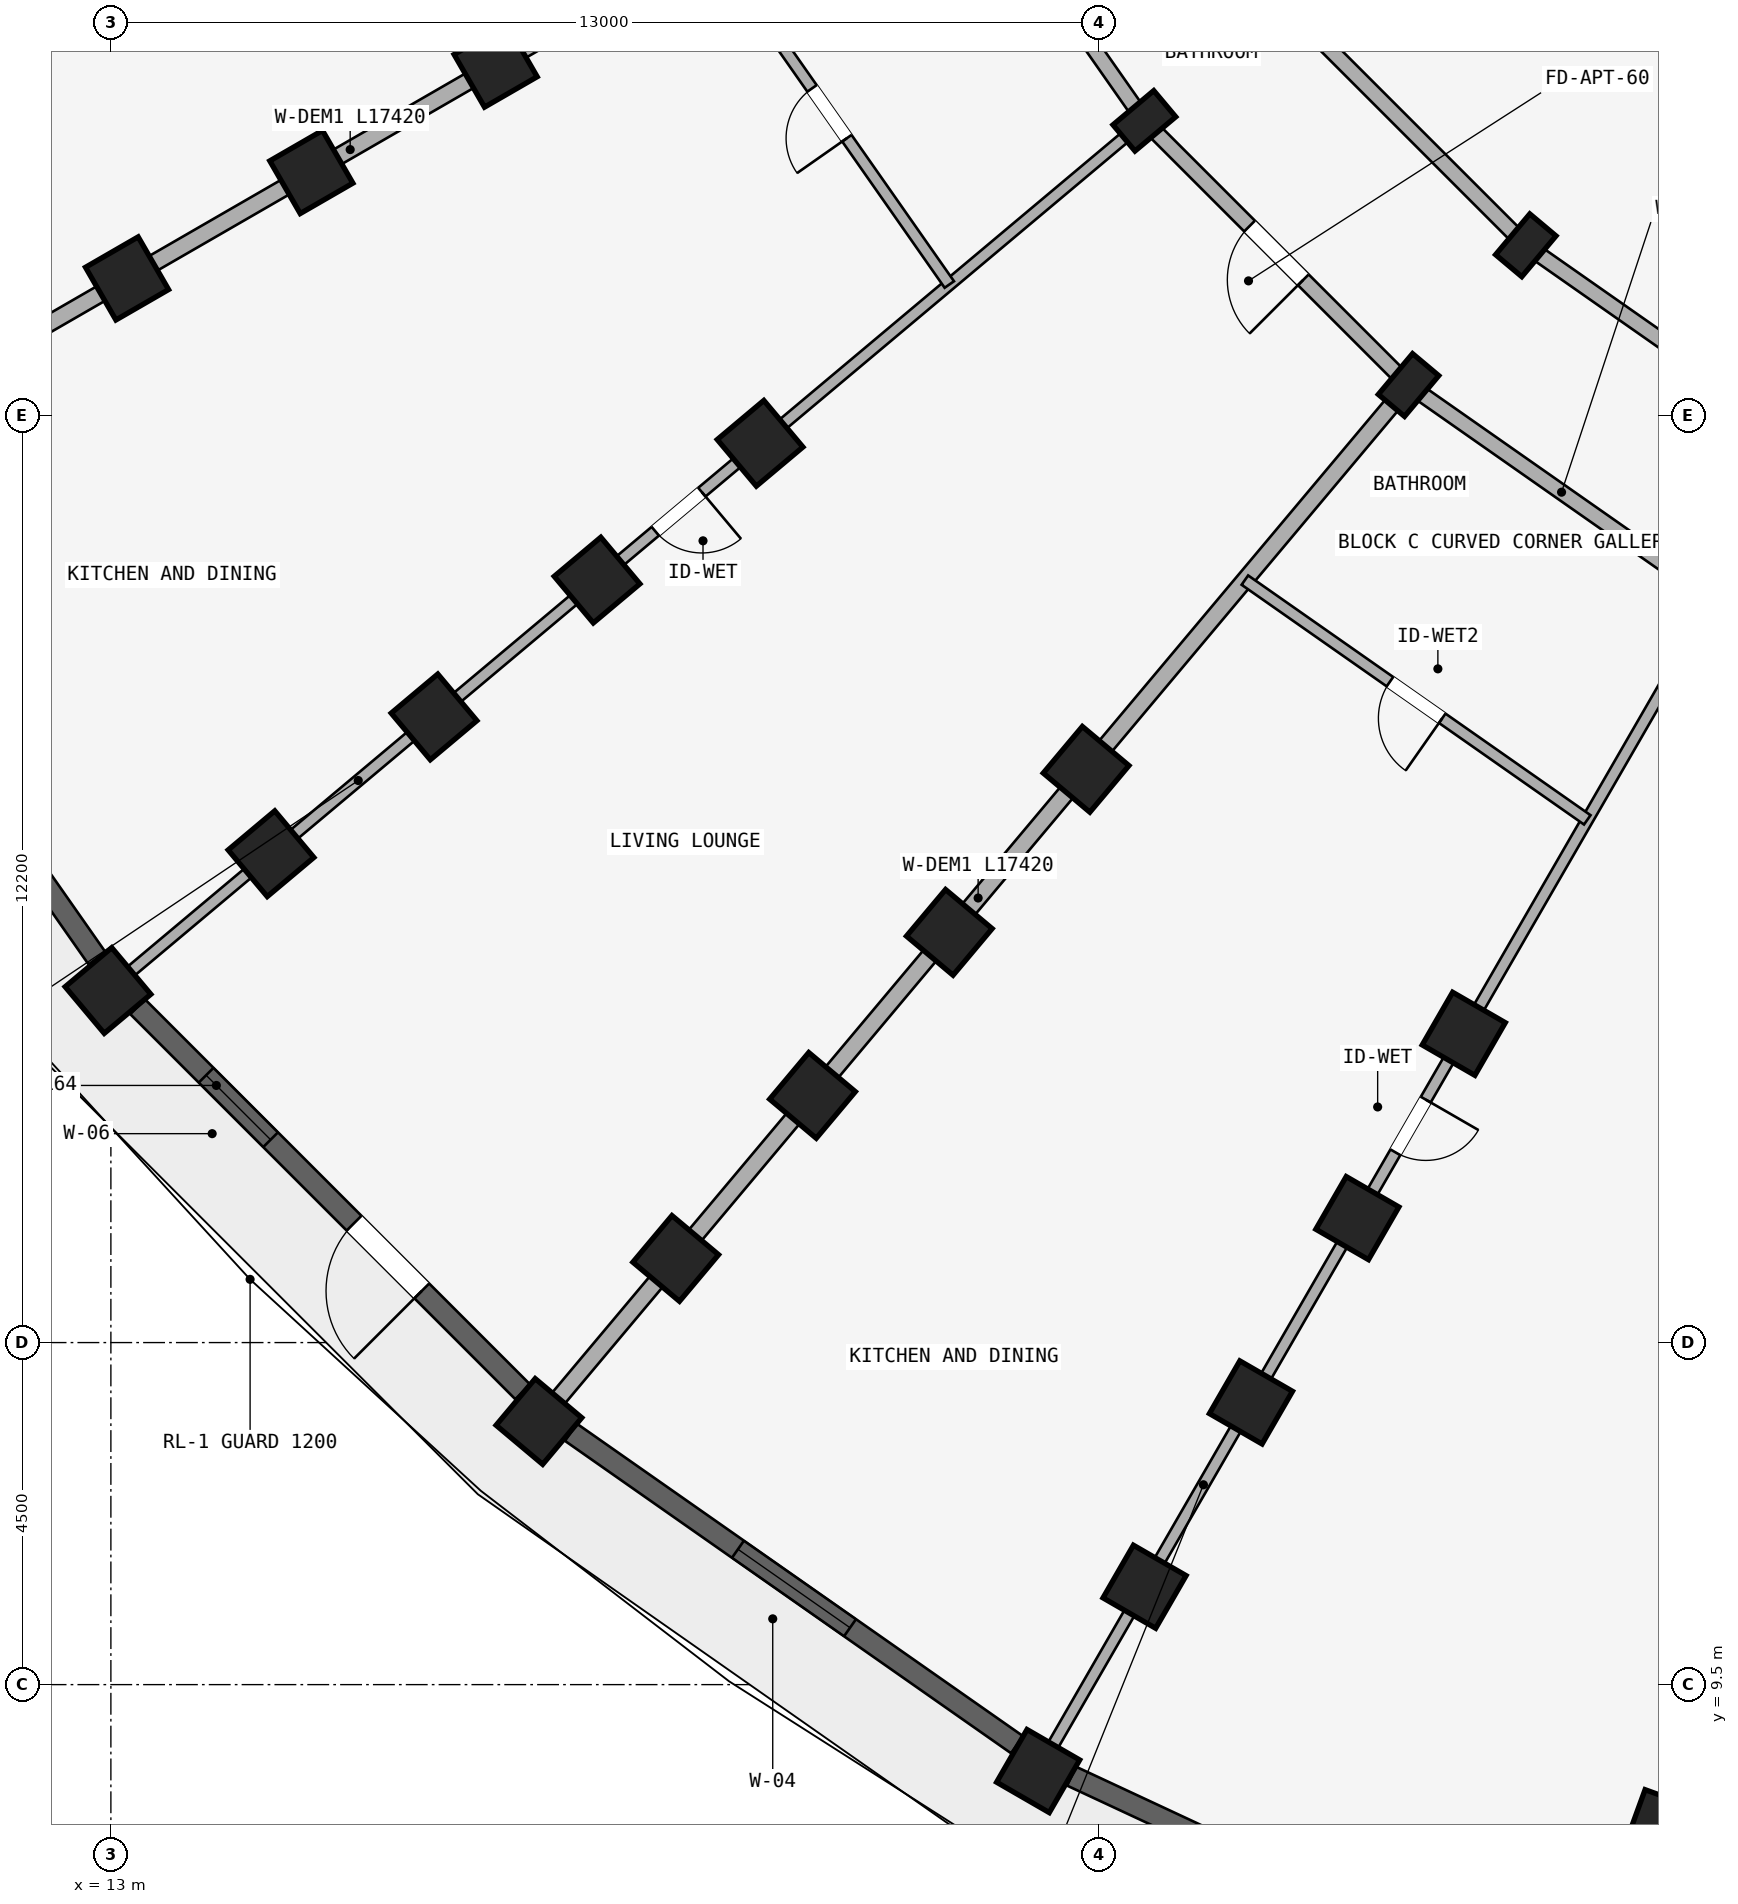
"""IFC4 building model, lengths in metres.
Left out: names, types, materials, properties, quantities, classifications, styles, units other than length and angle.
Written with IfcOpenShell. Run it as: python <this file> out.ifc"""

import sys

from ifc_helpers import new_model, si_unit, direction, frame, frame_2d, origin, origin_2d, place, context, subcontext, project, spatial, rectangle, extrude, element, fill, save


model = new_model("IFC4")
c1 = context("Model", 3, precision=1e-05, world=origin(), true_north=direction((0.0, 1.0)))
c2 = subcontext(c1, "Body", "Model", "MODEL_VIEW")
j1 = project(units=[si_unit("LENGTHUNIT", "METRE"), si_unit("PLANEANGLEUNIT", "RADIAN")], contexts=[c1])
p1 = place(None, origin())
s1 = spatial("IfcSite", under=j1, at=p1, CompositionType="ELEMENT")
p2 = place(p1, origin())
s2 = spatial("IfcBuilding", under=s1, at=p2, CompositionType="ELEMENT")
p3 = place(p2, frame((0.0, 0.0, 15.0)))
s3 = spatial("IfcBuildingStorey", under=s2, at=p3, CompositionType="ELEMENT", Elevation=15.0)
for number, where, z_axis, x_axis in (
    (1, (33.425, 7.605, 0.0), (0.0, 0.0, 1.0), (-0.94, 0.342, 0.0)),
    (2, (30.8, 18.062, 0.0), (0.0, 0.0, 1.0), (-0.866, 0.5, 0.0)),
    (3, (29.4, 15.637, 0.0), (0.0, 0.0, 1.0), (-0.866, 0.5, 0.0)),
    (4, (28.0, 13.213, 0.0), (0.0, 0.0, 1.0), (-0.866, 0.5, 0.0)),
    (5, (26.6, 10.788, 0.0), (0.0, 0.0, 1.0), (-0.866, 0.5, 0.0)),
    (6, (25.2, 8.363, 0.0), (0.0, 0.0, 1.0), (-0.866, 0.5, 0.0)),
):
    element("IfcColumn", number, at=place(p3, frame(where, z_axis=z_axis, x_axis=x_axis)), inside=s3, PredefinedType="COLUMN", context=c2, shape_type="SweptSolid", body=[
        extrude(rectangle(XDim=0.8, YDim=0.8, at=origin_2d()), origin(), (0.0, 0.0, 1.0), 2.93),
    ])
for number, where, z_axis, x_axis in (
    (7, (31.616, 28.436, 0.0), (0.0, 0.0, 1.0), (-0.766, 0.643, 0.0)),
    (8, (30.073, 26.598, 0.0), (0.0, 0.0, 1.0), (-0.766, 0.643, 0.0)),
):
    element("IfcColumn", number, at=place(p3, frame(where, z_axis=z_axis, x_axis=x_axis)), inside=s3, PredefinedType="COLUMN", context=c2, shape_type="SweptSolid", body=[
        extrude(rectangle(XDim=0.45, YDim=0.7, at=origin_2d()), origin(), (0.0, 0.0, 1.0), 2.93),
    ])
for number, where, z_axis, x_axis in (
    (9, (25.831, 21.542, 0.0), (0.0, 0.0, 1.0), (-0.766, 0.643, 0.0)),
    (10, (24.031, 19.397, 0.0), (0.0, 0.0, 1.0), (-0.766, 0.643, 0.0)),
    (11, (22.231, 17.252, 0.0), (0.0, 0.0, 1.0), (-0.766, 0.643, 0.0)),
    (12, (20.432, 15.107, 0.0), (0.0, 0.0, 1.0), (-0.766, 0.643, 0.0)),
    (13, (18.632, 12.962, 0.0), (0.0, 0.0, 1.0), (-0.766, 0.643, 0.0)),
):
    element("IfcColumn", number, at=place(p3, frame(where, z_axis=z_axis, x_axis=x_axis)), inside=s3, PredefinedType="COLUMN", context=c2, shape_type="SweptSolid", body=[
        extrude(rectangle(XDim=0.8, YDim=0.8, at=origin_2d()), origin(), (0.0, 0.0, 1.0), 2.93),
    ])
p4 = place(p3, frame((26.598, 30.073, 0.0), z_axis=(0.0, 0.0, 1.0), x_axis=(-0.642787609687, 0.766044443119, 0.0)))
e14 = element("IfcColumn", 14, at=p4, inside=s3, PredefinedType="COLUMN", context=c2, shape_type="SweptSolid", body=[
    extrude(rectangle(XDim=0.45, YDim=0.7, at=origin_2d()), origin(), (0.0, 0.0, 1.0), 2.93),
])
for number, where, z_axis, x_axis in (
    (15, (21.542, 25.831, 0.0), (0.0, 0.0, 1.0), (-0.643, 0.766, 0.0)),
    (16, (19.397, 24.031, 0.0), (0.0, 0.0, 1.0), (-0.643, 0.766, 0.0)),
    (17, (17.252, 22.231, 0.0), (0.0, 0.0, 1.0), (-0.643, 0.766, 0.0)),
    (18, (15.107, 20.432, 0.0), (0.0, 0.0, 1.0), (-0.643, 0.766, 0.0)),
    (19, (12.962, 18.632, 0.0), (0.0, 0.0, 1.0), (-0.643, 0.766, 0.0)),
    (20, (18.062, 30.8, 0.0), (0.0, 0.0, 1.0), (-0.5, 0.866, 0.0)),
    (21, (15.637, 29.4, 0.0), (0.0, 0.0, 1.0), (-0.5, 0.866, 0.0)),
    (22, (13.213, 28.0, 0.0), (0.0, 0.0, 1.0), (-0.5, 0.866, 0.0)),
):
    element("IfcColumn", number, at=place(p3, frame(where, z_axis=z_axis, x_axis=x_axis)), inside=s3, PredefinedType="COLUMN", context=c2, shape_type="SweptSolid", body=[
        extrude(rectangle(XDim=0.8, YDim=0.8, at=origin_2d()), origin(), (0.0, 0.0, 1.0), 2.93),
    ])
p5 = place(p3, frame((35.3, 25.856, 0.0), z_axis=(0.0, 0.0, 1.0), x_axis=(-0.819155404658, 0.573571637217, 0.0)))
e23 = element("IfcWall", 23, at=p5, inside=s3, PredefinedType="STANDARD", context=c2, shape_type="SweptSolid", body=[
    extrude(rectangle(XDim=4.497, YDim=0.2, at=frame_2d((2.249, 0.0))), origin(), (0.0, 0.0, 1.0), 2.372),
])
p6 = place(p3, frame((34.1, 23.778, 0.0), z_axis=(0.0, 0.0, 1.0), x_axis=(-0.819140911474, 0.573592335331, 0.0)))
e24 = element("IfcWall", 24, at=p6, inside=s3, PredefinedType="STANDARD", context=c2, shape_type="SweptSolid", body=[
    extrude(rectangle(XDim=4.916, YDim=0.2, at=frame_2d((2.458, 0.0))), origin(), (0.0, 0.0, 1.0), 2.372),
])
p7 = place(p3, frame((31.616, 28.436, 0.0), z_axis=(0.0, 0.0, 1.0), x_axis=(-0.707106781187, 0.707106781187, 0.0)))
e25 = element("IfcWall", 25, at=p7, inside=s3, PredefinedType="STANDARD", context=c2, shape_type="SweptSolid", body=[
    extrude(rectangle(XDim=4.497, YDim=0.2, at=frame_2d((2.249, 0.0))), origin(), (0.0, 0.0, 1.0), 2.372),
])
p8 = place(p3, frame((30.073, 26.598, 0.0), z_axis=(0.0, 0.0, 1.0), x_axis=(-0.707106781187, 0.707106781187, 0.0)))
e26 = element("IfcWall", 26, at=p8, inside=s3, PredefinedType="STANDARD", context=c2, shape_type="SweptSolid", body=[
    extrude(rectangle(XDim=4.916, YDim=0.2, at=frame_2d((2.458, 0.0))), origin(), (0.0, 0.0, 1.0), 2.372),
])
p9 = place(p8, frame((1.958, 0.0, 0.0)))
e27 = element("IfcOpeningElement", 27, at=p9, cuts=e26, PredefinedType="OPENING", context=c2, shape_type="SweptSolid", body=[
    extrude(rectangle(XDim=1.0, YDim=2.15, at=frame_2d((0.5, 1.075))), frame((0.0, 0.11, 0.0), z_axis=(0.0, -1.0, 0.0), x_axis=(1.0, 0.0, 0.0)), (0.0, 0.0, 1.0), 0.22),
])
p10 = place(p3, frame((26.598, 30.073, 0.0), z_axis=(0.0, 0.0, 1.0), x_axis=(-0.573592335331, 0.819140911474, 0.0)))
e28 = element("IfcWall", 28, at=p10, inside=s3, PredefinedType="STANDARD", context=c2, shape_type="SweptSolid", body=[
    extrude(rectangle(XDim=4.916, YDim=0.2, at=frame_2d((2.458, 0.0))), origin(), (0.0, 0.0, 1.0), 2.372),
])
p11 = place(p3, frame((38.521, 21.607, 0.0), z_axis=(0.0, 0.0, 1.0), x_axis=(-0.342022120477, -0.939691901159, 0.0)))
e29 = element("IfcWall", 29, at=p11, inside=s3, PredefinedType="PARTITIONING", context=c2, shape_type="SweptSolid", body=[
    extrude(rectangle(XDim=17.42, YDim=0.15, at=frame_2d((8.71, 0.0))), origin(), (0.0, 0.0, 1.0), 2.372),
])
p12 = place(p11, frame((7.5, 0.0, 0.0)))
e30 = element("IfcOpeningElement", 30, at=p12, cuts=e29, PredefinedType="OPENING", context=c2, shape_type="SweptSolid", body=[
    extrude(rectangle(XDim=0.8, YDim=2.1, at=frame_2d((0.4, 1.05))), frame((0.0, 0.085, 0.0), z_axis=(0.0, -1.0, 0.0), x_axis=(1.0, 0.0, 0.0)), (0.0, 0.0, 1.0), 0.17),
])
p13 = place(p3, frame((34.05, 23.691, 0.0), z_axis=(0.0, 0.0, 1.0), x_axis=(-0.499997843263, -0.866026648973, 0.0)))
e31 = element("IfcWall", 31, at=p13, inside=s3, PredefinedType="PARTITIONING", context=c2, shape_type="SweptSolid", body=[
    extrude(rectangle(XDim=17.42, YDim=0.15, at=frame_2d((8.71, 0.0))), origin(), (0.0, 0.0, 1.0), 2.372),
])
p14 = place(p13, frame((7.5, 0.0, 0.0)))
e32 = element("IfcOpeningElement", 32, at=p14, cuts=e31, PredefinedType="OPENING", context=c2, shape_type="SweptSolid", body=[
    extrude(rectangle(XDim=0.8, YDim=2.1, at=frame_2d((0.4, 1.05))), frame((0.0, 0.085, 0.0), z_axis=(0.0, -1.0, 0.0), x_axis=(1.0, 0.0, 0.0)), (0.0, 0.0, 1.0), 0.17),
])
p15 = place(p3, frame((30.009, 26.521, 0.0), z_axis=(0.0, 0.0, 1.0), x_axis=(-0.642784757967, -0.766046835987, 0.0)))
e33 = element("IfcWall", 33, at=p15, inside=s3, PredefinedType="STANDARD", context=c2, shape_type="SweptSolid", body=[
    extrude(rectangle(XDim=17.42, YDim=0.22, at=frame_2d((8.71, 0.0))), origin(), (0.0, 0.0, 1.0), 2.372),
])
p16 = place(p3, frame((26.521, 30.009, 0.0), z_axis=(0.0, 0.0, 1.0), x_axis=(-0.766046835987, -0.642784757967, 0.0)))
e34 = element("IfcWall", 34, at=p16, inside=s3, PredefinedType="PARTITIONING", context=c2, shape_type="SweptSolid", body=[
    extrude(rectangle(XDim=17.42, YDim=0.15, at=frame_2d((8.71, 0.0))), origin(), (0.0, 0.0, 1.0), 2.372),
])
p17 = place(p16, frame((7.5, 0.0, 0.0)))
e35 = element("IfcOpeningElement", 35, at=p17, cuts=e34, PredefinedType="OPENING", context=c2, shape_type="SweptSolid", body=[
    extrude(rectangle(XDim=0.8, YDim=2.1, at=frame_2d((0.4, 1.05))), frame((0.0, 0.085, 0.0), z_axis=(0.0, -1.0, 0.0), x_axis=(1.0, 0.0, 0.0)), (0.0, 0.0, 1.0), 0.17),
])
p18 = place(p3, frame((23.691, 34.05, 0.0), z_axis=(0.0, 0.0, 1.0), x_axis=(-0.866026648973, -0.499997843263, 0.0)))
e36 = element("IfcWall", 36, at=p18, inside=s3, PredefinedType="STANDARD", context=c2, shape_type="SweptSolid", body=[
    extrude(rectangle(XDim=17.42, YDim=0.22, at=frame_2d((8.71, 0.0))), origin(), (0.0, 0.0, 1.0), 2.372),
])
p19 = place(p3, frame((32.425, 20.877, 0.0), z_axis=(0.0, 0.0, 1.0), x_axis=(-0.819156831143, 0.573569599955, 0.0)))
e37 = element("IfcWall", 37, at=p19, inside=s3, PredefinedType="PLUMBINGWALL", context=c2, shape_type="SweptSolid", body=[
    extrude(rectangle(XDim=5.5, YDim=0.15, at=frame_2d((2.75, 0.0))), origin(), (0.0, 0.0, 1.0), 2.372),
])
p20 = place(p19, frame((2.33, 0.0, 0.0)))
e38 = element("IfcOpeningElement", 38, at=p20, cuts=e37, PredefinedType="OPENING", context=c2, shape_type="SweptSolid", body=[
    extrude(rectangle(XDim=0.84, YDim=2.1, at=frame_2d((0.42, 1.05))), frame((0.0, 0.085, 0.0), z_axis=(0.0, -1.0, 0.0), x_axis=(1.0, 0.0, 0.0)), (0.0, 0.0, 1.0), 0.17),
])
p21 = place(p3, frame((24.031, 27.92, 0.0), z_axis=(0.0, 0.0, 1.0), x_axis=(-0.573569599955, 0.819156831143, 0.0)))
e39 = element("IfcWall", 39, at=p21, inside=s3, PredefinedType="PLUMBINGWALL", context=c2, shape_type="SweptSolid", body=[
    extrude(rectangle(XDim=5.5, YDim=0.15, at=frame_2d((2.75, 0.0))), origin(), (0.0, 0.0, 1.0), 2.372),
])
p22 = place(p21, frame((2.35, 0.0, 0.0)))
e40 = element("IfcOpeningElement", 40, at=p22, cuts=e39, PredefinedType="OPENING", context=c2, shape_type="SweptSolid", body=[
    extrude(rectangle(XDim=0.8, YDim=2.1, at=frame_2d((0.4, 1.05))), frame((0.0, 0.085, 0.0), z_axis=(0.0, -1.0, 0.0), x_axis=(1.0, 0.0, 0.0)), (0.0, 0.0, 1.0), 0.17),
])
p23 = place(p3, frame((32.133, 5.268, 0.0), z_axis=(0.0, 0.0, 1.0), x_axis=(-0.906300636296, 0.422633596215, 0.0)))
e41 = element("IfcWall", 41, at=p23, inside=s3, PredefinedType="STANDARD", context=c2, shape_type="SweptSolid", body=[
    extrude(rectangle(XDim=7.164, YDim=0.275, at=frame_2d((3.582, 0.0))), origin(), (0.0, 0.0, 1.0), 2.472),
])
p24 = place(p23, frame((2.607, 0.0, 0.422)))
e42 = element("IfcOpeningElement", 42, at=p24, cuts=e41, PredefinedType="OPENING", context=c2, shape_type="SweptSolid", body=[
    extrude(rectangle(XDim=1.95, YDim=1.85, at=frame_2d((0.975, 0.925))), frame((0.0, 0.147, 0.0), z_axis=(0.0, -1.0, 0.0), x_axis=(1.0, 0.0, 0.0)), (0.0, 0.0, 1.0), 0.295),
])
p25 = place(p3, frame((24.922, 8.71, 0.0), z_axis=(0.0, 0.0, 1.0), x_axis=(-0.819161471697, 0.573562972382, 0.0)))
e43 = element("IfcWall", 43, at=p25, inside=s3, PredefinedType="STANDARD", context=c2, shape_type="SweptSolid", body=[
    extrude(rectangle(XDim=7.164, YDim=0.275, at=frame_2d((3.582, 0.0))), origin(), (0.0, 0.0, 1.0), 2.472),
])
p26 = place(p25, frame((2.682, 0.0, 0.622)))
e44 = element("IfcOpeningElement", 44, at=p26, cuts=e43, PredefinedType="OPENING", context=c2, shape_type="SweptSolid", body=[
    extrude(rectangle(XDim=1.8, YDim=1.65, at=frame_2d((0.9, 0.825))), frame((0.0, 0.147, 0.0), z_axis=(0.0, -1.0, 0.0), x_axis=(1.0, 0.0, 0.0)), (0.0, 0.0, 1.0), 0.295),
])
p27 = place(p3, frame((18.418, 13.352, 0.0), z_axis=(0.0, 0.0, 1.0), x_axis=(-0.707106781187, 0.707106781187, 0.0)))
e45 = element("IfcWall", 45, at=p27, inside=s3, PredefinedType="STANDARD", context=c2, shape_type="SweptSolid", body=[
    extrude(rectangle(XDim=7.164, YDim=0.275, at=frame_2d((3.582, 0.0))), origin(), (0.0, 0.0, 1.0), 2.472),
])
p28 = place(p27, frame((4.69, 0.0, 0.522)))
e46 = element("IfcOpeningElement", 46, at=p28, cuts=e45, PredefinedType="OPENING", context=c2, shape_type="SweptSolid", body=[
    extrude(rectangle(XDim=1.2, YDim=1.5, at=frame_2d((0.6, 0.75))), frame((0.0, 0.147, 0.0), z_axis=(0.0, -1.0, 0.0), x_axis=(1.0, 0.0, 0.0)), (0.0, 0.0, 1.0), 0.295),
])
p29 = place(p27, frame((1.877, 0.0, 0.0)))
e47 = element("IfcOpeningElement", 47, at=p29, cuts=e45, PredefinedType="OPENING", context=c2, shape_type="SweptSolid", body=[
    extrude(rectangle(XDim=1.26, YDim=2.15, at=frame_2d((0.63, 1.075))), frame((0.0, 0.147, 0.0), z_axis=(0.0, -1.0, 0.0), x_axis=(1.0, 0.0, 0.0)), (0.0, 0.0, 1.0), 0.295),
])
p30 = place(p3, frame((12.819, 19.053, 0.0), z_axis=(0.0, 0.0, 1.0), x_axis=(-0.573562972382, 0.819161471697, 0.0)))
e48 = element("IfcWall", 48, at=p30, inside=s3, PredefinedType="STANDARD", context=c2, shape_type="SweptSolid", body=[
    extrude(rectangle(XDim=7.164, YDim=0.275, at=frame_2d((3.582, 0.0))), origin(), (0.0, 0.0, 1.0), 2.472),
])
p31 = place(p30, frame((2.457, 0.0, 0.322)))
e49 = element("IfcOpeningElement", 49, at=p31, cuts=e48, PredefinedType="OPENING", context=c2, shape_type="SweptSolid", body=[
    extrude(rectangle(XDim=2.25, YDim=1.95, at=frame_2d((1.125, 0.975))), frame((0.0, 0.147, 0.0), z_axis=(0.0, -1.0, 0.0), x_axis=(1.0, 0.0, 0.0)), (0.0, 0.0, 1.0), 0.295),
])
p32 = place(p26, origin())
e50 = element("IfcWindow", 50, at=p32, inside=s3, PartitioningType="DOUBLE_PANEL_VERTICAL", PredefinedType="WINDOW", context=c2, shape_type="SweptSolid", body=[
    extrude(rectangle(XDim=1.8, YDim=1.65, at=frame_2d((0.9, 0.825))), frame((0.0, 0.03, 0.0), z_axis=(0.0, -1.0, 0.0), x_axis=(1.0, 0.0, 0.0)), (0.0, 0.0, 1.0), 0.06),
])
fill(e44, e50)
p33 = place(p28, origin())
e51 = element("IfcWindow", 51, at=p33, inside=s3, PartitioningType="SINGLE_PANEL", PredefinedType="WINDOW", context=c2, shape_type="SweptSolid", body=[
    extrude(rectangle(XDim=1.2, YDim=1.5, at=frame_2d((0.6, 0.75))), frame((0.0, 0.03, 0.0), z_axis=(0.0, -1.0, 0.0), x_axis=(1.0, 0.0, 0.0)), (0.0, 0.0, 1.0), 0.06),
])
fill(e46, e51)
p34 = place(p14, origin())
e52 = element("IfcDoor", 52, at=p34, inside=s3, OperationType="SINGLE_SWING_LEFT", PredefinedType="DOOR", context=c2, shape_type="SweptSolid", body=[
    extrude(rectangle(XDim=0.8, YDim=2.1, at=frame_2d((0.4, 1.05))), frame((0.0, 0.025, 0.0), z_axis=(0.0, -1.0, 0.0), x_axis=(1.0, 0.0, 0.0)), (0.0, 0.0, 1.0), 0.05),
])
fill(e32, e52)
p35 = place(p17, frame((0.8, 0.0, 0.0), z_axis=(0.0, 0.0, 1.0), x_axis=(-1.0, 0.0, 0.0)))
e53 = element("IfcDoor", 53, at=p35, inside=s3, OperationType="SINGLE_SWING_RIGHT", PredefinedType="DOOR", context=c2, shape_type="SweptSolid", body=[
    extrude(rectangle(XDim=0.8, YDim=2.1, at=frame_2d((0.4, 1.05))), frame((0.0, 0.025, 0.0), z_axis=(0.0, -1.0, 0.0), x_axis=(1.0, 0.0, 0.0)), (0.0, 0.0, 1.0), 0.05),
])
fill(e35, e53)
p36 = place(p20, origin())
e54 = element("IfcDoor", 54, at=p36, inside=s3, OperationType="SINGLE_SWING_LEFT", PredefinedType="DOOR", context=c2, shape_type="SweptSolid", body=[
    extrude(rectangle(XDim=0.84, YDim=2.1, at=frame_2d((0.42, 1.05))), frame((0.0, 0.025, 0.0), z_axis=(0.0, -1.0, 0.0), x_axis=(1.0, 0.0, 0.0)), (0.0, 0.0, 1.0), 0.05),
])
fill(e38, e54)
p37 = place(p9, frame((1.0, 0.0, 0.0), z_axis=(0.0, 0.0, 1.0), x_axis=(-1.0, 0.0, 0.0)))
e55 = element("IfcDoor", 55, at=p37, inside=s3, OperationType="SINGLE_SWING_RIGHT", PredefinedType="DOOR", context=c2, shape_type="SweptSolid", body=[
    extrude(rectangle(XDim=1.0, YDim=2.15, at=frame_2d((0.5, 1.075))), frame((0.0, 0.025, 0.0), z_axis=(0.0, -1.0, 0.0), x_axis=(1.0, 0.0, 0.0)), (0.0, 0.0, 1.0), 0.05),
])
fill(e27, e55)
p38 = place(p22, origin())
e56 = element("IfcDoor", 56, at=p38, inside=s3, OperationType="SINGLE_SWING_LEFT", PredefinedType="DOOR", context=c2, shape_type="SweptSolid", body=[
    extrude(rectangle(XDim=0.8, YDim=2.1, at=frame_2d((0.4, 1.05))), frame((0.0, 0.025, 0.0), z_axis=(0.0, -1.0, 0.0), x_axis=(1.0, 0.0, 0.0)), (0.0, 0.0, 1.0), 0.05),
])
fill(e40, e56)
p39 = place(p29, origin())
e57 = element("IfcDoor", 57, at=p39, inside=s3, OperationType="SINGLE_SWING_LEFT", PredefinedType="DOOR", context=c2, shape_type="SweptSolid", body=[
    extrude(rectangle(XDim=1.26, YDim=2.15, at=frame_2d((0.63, 1.075))), frame((0.0, 0.025, 0.0), z_axis=(0.0, -1.0, 0.0), x_axis=(1.0, 0.0, 0.0)), (0.0, 0.0, 1.0), 0.05),
])
fill(e47, e57)
save(model, sys.argv[1])
